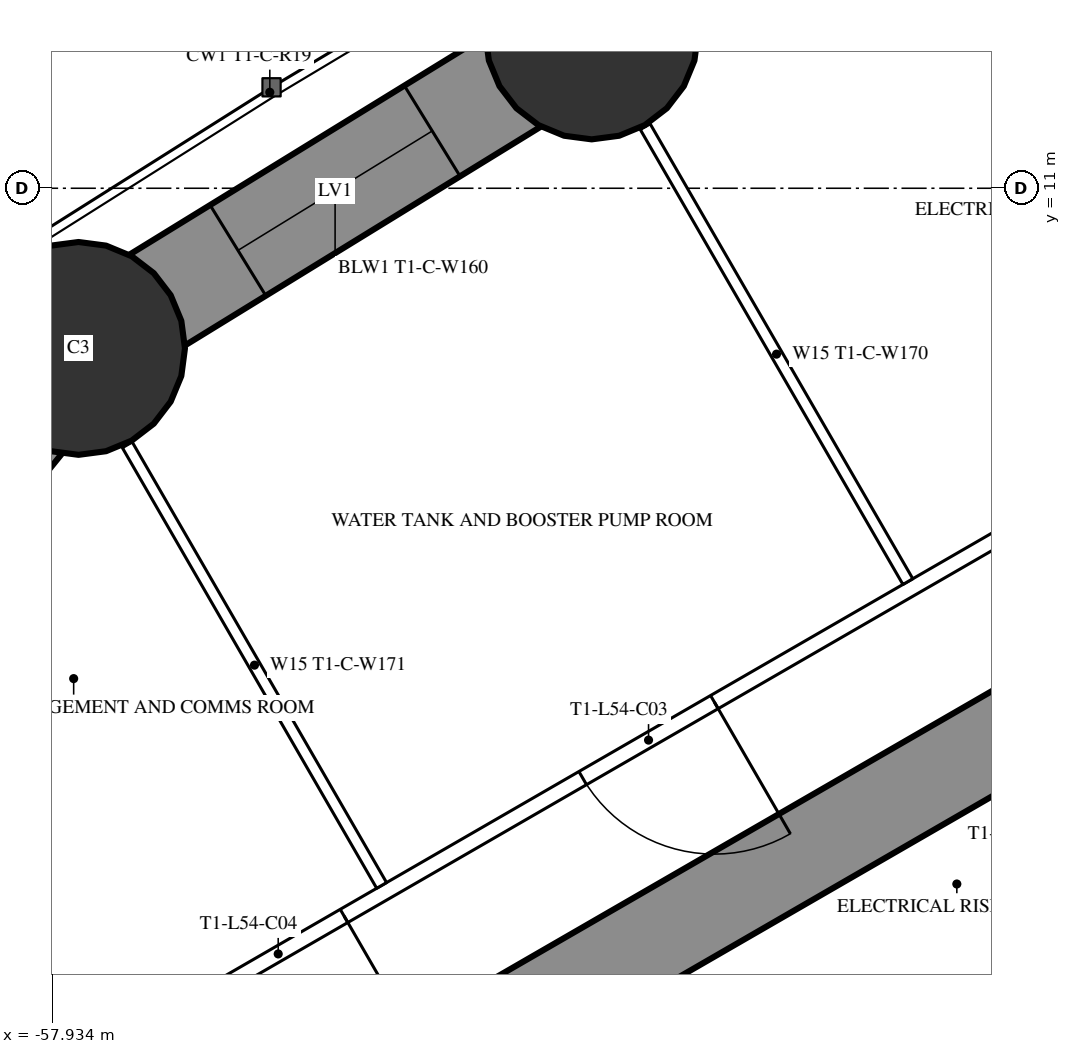
"""IFC4 building model, lengths in metres.
Left out: names, types, materials, properties, quantities, classifications, styles, units other than length and angle.
Written with IfcOpenShell. Run it as: python <this file> out.ifc"""

import sys

from ifc_helpers import new_model, si_unit, direction, frame, frame_2d, origin, origin_2d, place, context, subcontext, project, spatial, rectangle, circle, extrude, element, fill, save


model = new_model("IFC4")
c1 = context("Model", 3, precision=1e-05, world=origin(), true_north=direction((0.0, 1.0)))
c2 = subcontext(c1, "Body", "Model", "MODEL_VIEW")
j1 = project(units=[si_unit("LENGTHUNIT", "METRE"), si_unit("PLANEANGLEUNIT", "RADIAN")], contexts=[c1])
p1 = place(None, origin())
s1 = spatial("IfcSite", under=j1, at=p1, CompositionType="ELEMENT")
p2 = place(p1, origin())
s2 = spatial("IfcBuilding", under=s1, at=p2, CompositionType="ELEMENT")
p3 = place(p2, frame((0.0, 0.0, 201.8)))
s3 = spatial("IfcBuildingStorey", under=s2, at=p3, CompositionType="ELEMENT", Elevation=201.8)
for number, where, z_axis, x_axis in (
    (1, (-50.839, 13.043, 0.0), (0.0, 0.0, 1.0), (1.0, 0.0, 0.0)),
    (2, (-57.59, 8.893, 0.0), (0.0, 0.0, 1.0), (1.0, 0.0, 0.0)),
):
    element("IfcColumn", number, at=place(p3, frame(where, z_axis=z_axis, x_axis=x_axis)), inside=s3, PredefinedType="COLUMN", context=c2, shape_type="SweptSolid", body=[
        extrude(circle(Radius=1.4, at=origin_2d()), origin(), (0.0, 0.0, 1.0), 3.5),
    ])
p4 = place(p3, frame((-27.2, 14.3, 0.0), z_axis=(0.0, 0.0, 1.0), x_axis=(-0.866026593062, -0.499997940104, 0.0)))
e3 = element("IfcWall", 3, at=p4, inside=s3, PredefinedType="SHEAR", context=c2, shape_type="SweptSolid", body=[
    extrude(rectangle(XDim=28.946, YDim=1.2, at=frame_2d((14.473, 0.0))), origin(), (0.0, 0.0, 1.0), 3.5),
])
p5 = place(p4, frame((6.5, 0.0, 0.0)))
e4 = element("IfcOpeningElement", 4, at=p5, cuts=e3, PredefinedType="OPENING", context=c2, shape_type="SweptSolid", body=[
    extrude(rectangle(XDim=1.0, YDim=2.2, at=frame_2d((0.5, 1.1))), frame((0.0, 0.61, 0.0), z_axis=(0.0, -1.0, 0.0), x_axis=(1.0, 0.0, 0.0)), (0.0, 0.0, 1.0), 1.22),
])
p6 = place(p4, frame((13.395, 0.0, 0.0)))
e5 = element("IfcOpeningElement", 5, at=p6, cuts=e3, PredefinedType="OPENING", context=c2, shape_type="SweptSolid", body=[
    extrude(rectangle(XDim=1.8, YDim=2.03, at=frame_2d((0.9, 1.015))), frame((0.0, 0.61, 0.0), z_axis=(0.0, -1.0, 0.0), x_axis=(1.0, 0.0, 0.0)), (0.0, 0.0, 1.0), 1.22),
])
p7 = place(p3, frame((-43.9, 16.871, 0.0), z_axis=(0.0, 0.0, 1.0), x_axis=(-0.875577684027, -0.483077342911, 0.0)))
e6 = element("IfcWall", 6, at=p7, inside=s3, PredefinedType="SHEAR", context=c2, shape_type="SweptSolid", body=[
    extrude(rectangle(XDim=7.925, YDim=1.4, at=frame_2d((3.962, 0.0))), origin(), (0.0, 0.0, 1.0), 3.5),
])
p8 = place(p7, frame((2.462, 0.0, 0.6)))
e7 = element("IfcOpeningElement", 7, at=p8, cuts=e6, PredefinedType="OPENING", context=c2, shape_type="SweptSolid", body=[
    extrude(rectangle(XDim=3.0, YDim=1.2, at=frame_2d((1.5, 0.6))), frame((0.0, 0.71, 0.0), z_axis=(0.0, -1.0, 0.0), x_axis=(1.0, 0.0, 0.0)), (0.0, 0.0, 1.0), 1.42),
])
p9 = place(p3, frame((-50.839, 13.043, 0.0), z_axis=(0.0, 0.0, 1.0), x_axis=(-0.851892008043, -0.523717487423, 0.0)))
e8 = element("IfcWall", 8, at=p9, inside=s3, PredefinedType="SHEAR", context=c2, shape_type="SweptSolid", body=[
    extrude(rectangle(XDim=7.924, YDim=1.4, at=frame_2d((3.962, 0.0))), origin(), (0.0, 0.0, 1.0), 3.5),
])
p10 = place(p9, frame((2.462, 0.0, 0.6)))
e9 = element("IfcOpeningElement", 9, at=p10, cuts=e8, PredefinedType="OPENING", context=c2, shape_type="SweptSolid", body=[
    extrude(rectangle(XDim=3.0, YDim=1.2, at=frame_2d((1.5, 0.6))), frame((0.0, 0.71, 0.0), z_axis=(0.0, -1.0, 0.0), x_axis=(1.0, 0.0, 0.0)), (0.0, 0.0, 1.0), 1.42),
])
p11 = place(p3, frame((-57.59, 8.893, 0.0), z_axis=(0.0, 0.0, 1.0), x_axis=(-0.628373846765, -0.777911504416, 0.0)))
e10 = element("IfcWall", 10, at=p11, inside=s3, PredefinedType="SHEAR", context=c2, shape_type="SweptSolid", body=[
    extrude(rectangle(XDim=13.611, YDim=1.4, at=frame_2d((6.806, 0.0))), origin(), (0.0, 0.0, 1.0), 3.5),
])
p12 = place(p11, frame((5.306, 0.0, 0.6)))
e11 = element("IfcOpeningElement", 11, at=p12, cuts=e10, PredefinedType="OPENING", context=c2, shape_type="SweptSolid", body=[
    extrude(rectangle(XDim=3.0, YDim=1.2, at=frame_2d((1.5, 0.6))), frame((0.0, 0.71, 0.0), z_axis=(0.0, -1.0, 0.0), x_axis=(1.0, 0.0, 0.0)), (0.0, 0.0, 1.0), 1.42),
])
p13 = place(p3, frame((-27.803, 16.608, 0.0), z_axis=(0.0, 0.0, 1.0), x_axis=(-0.866025851808, -0.499999223999, 0.0)))
e12 = element("IfcWall", 12, at=p13, inside=s3, PredefinedType="PARTITIONING", context=c2, shape_type="SweptSolid", body=[
    extrude(rectangle(XDim=33.215, YDim=0.2, at=frame_2d((16.608, 0.0))), origin(), (0.0, 0.0, 1.0), 3.25),
])
p14 = place(p13, frame((5.584, 0.0, 0.0)))
e13 = element("IfcOpeningElement", 13, at=p14, cuts=e12, PredefinedType="OPENING", context=c2, shape_type="SweptSolid", body=[
    extrude(rectangle(XDim=2.0, YDim=2.4, at=frame_2d((1.0, 1.2))), frame((0.0, 0.11, 0.0), z_axis=(0.0, -1.0, 0.0), x_axis=(1.0, 0.0, 0.0)), (0.0, 0.0, 1.0), 0.22),
])
p15 = place(p13, frame((17.04, 0.0, 0.0)))
e14 = element("IfcOpeningElement", 14, at=p15, cuts=e12, PredefinedType="OPENING", context=c2, shape_type="SweptSolid", body=[
    extrude(rectangle(XDim=2.0, YDim=2.4, at=frame_2d((1.0, 1.2))), frame((0.0, 0.11, 0.0), z_axis=(0.0, -1.0, 0.0), x_axis=(1.0, 0.0, 0.0)), (0.0, 0.0, 1.0), 0.22),
])
p16 = place(p13, frame((24.735, 0.0, 0.0)))
e15 = element("IfcOpeningElement", 15, at=p16, cuts=e12, PredefinedType="OPENING", context=c2, shape_type="SweptSolid", body=[
    extrude(rectangle(XDim=2.0, YDim=2.4, at=frame_2d((1.0, 1.2))), frame((0.0, 0.11, 0.0), z_axis=(0.0, -1.0, 0.0), x_axis=(1.0, 0.0, 0.0)), (0.0, 0.0, 1.0), 0.22),
])
p17 = place(p13, frame((30.361, 0.0, 0.0)))
e16 = element("IfcOpeningElement", 16, at=p17, cuts=e12, PredefinedType="OPENING", context=c2, shape_type="SweptSolid", body=[
    extrude(rectangle(XDim=2.0, YDim=2.03, at=frame_2d((1.0, 1.015))), frame((0.0, 0.11, 0.0), z_axis=(0.0, -1.0, 0.0), x_axis=(1.0, 0.0, 0.0)), (0.0, 0.0, 1.0), 0.22),
])
p18 = place(p3, frame((-46.679, 5.825, 0.0), z_axis=(0.0, 0.0, 1.0), x_axis=(-0.500006839597, 0.866021454905, 0.0)))
e17 = element("IfcWall", 17, at=p18, inside=s3, PredefinedType="PARTITIONING", context=c2, shape_type="SweptSolid", body=[
    extrude(rectangle(XDim=6.911, YDim=0.15, at=frame_2d((3.456, 0.0))), origin(), (0.0, 0.0, 1.0), 2.05),
])
p19 = place(p3, frame((-53.602, 1.828, 0.0), z_axis=(0.0, 0.0, 1.0), x_axis=(-0.49999191814, 0.866030069798, 0.0)))
e18 = element("IfcWall", 18, at=p19, inside=s3, PredefinedType="PARTITIONING", context=c2, shape_type="SweptSolid", body=[
    extrude(rectangle(XDim=6.692, YDim=0.15, at=frame_2d((3.346, 0.0))), origin(), (0.0, 0.0, 1.0), 2.05),
])
p20 = place(p10, origin())
e19 = element("IfcWindow", 19, at=p20, inside=s3, PartitioningType="SINGLE_PANEL", PredefinedType="WINDOW", context=c2, shape_type="SweptSolid", body=[
    extrude(rectangle(XDim=3.0, YDim=1.2, at=frame_2d((1.5, 0.6))), frame((0.0, 0.03, 0.0), z_axis=(0.0, -1.0, 0.0), x_axis=(1.0, 0.0, 0.0)), (0.0, 0.0, 1.0), 0.06),
])
fill(e9, e19)
p21 = place(p16, origin())
e20 = element("IfcDoor", 20, at=p21, inside=s3, OperationType="DOUBLE_DOOR_SINGLE_SWING", PredefinedType="DOOR", context=c2, shape_type="SweptSolid", body=[
    extrude(rectangle(XDim=2.0, YDim=2.4, at=frame_2d((1.0, 1.2))), frame((0.0, 0.025, 0.0), z_axis=(0.0, -1.0, 0.0), x_axis=(1.0, 0.0, 0.0)), (0.0, 0.0, 1.0), 0.05),
])
fill(e15, e20)
p22 = place(p17, origin())
e21 = element("IfcDoor", 21, at=p22, inside=s3, OperationType="DOUBLE_DOOR_SINGLE_SWING", PredefinedType="DOOR", context=c2, shape_type="SweptSolid", body=[
    extrude(rectangle(XDim=2.0, YDim=2.03, at=frame_2d((1.0, 1.015))), frame((0.0, 0.025, 0.0), z_axis=(0.0, -1.0, 0.0), x_axis=(1.0, 0.0, 0.0)), (0.0, 0.0, 1.0), 0.05),
])
fill(e16, e21)
save(model, sys.argv[1])
